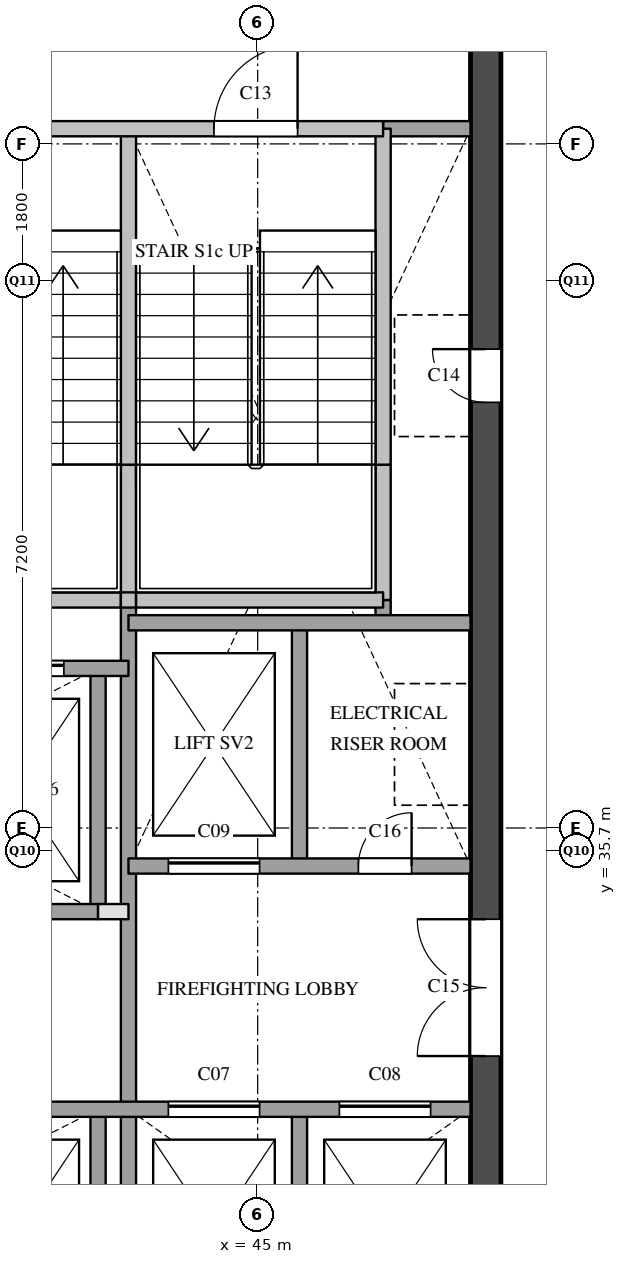
"""IFC4 building model, lengths in metres.
Left out: names, types, materials, properties, quantities, classifications, styles, units other than length and angle.
Written with IfcOpenShell. Run it as: python <this file> out.ifc"""

import sys

from ifc_helpers import new_model, si_unit, direction, frame, frame_2d, origin, place, context, subcontext, project, spatial, rectangle, extrude, element, fill, save


model = new_model("IFC4")
c1 = context("Model", 3, precision=1e-05, world=origin(), true_north=direction((0.0, 1.0)))
c2 = subcontext(c1, "Body", "Model", "MODEL_VIEW")
j1 = project(units=[si_unit("LENGTHUNIT", "METRE"), si_unit("PLANEANGLEUNIT", "RADIAN")], contexts=[c1])
p1 = place(None, origin())
s1 = spatial("IfcSite", under=j1, at=p1, CompositionType="ELEMENT")
p2 = place(p1, origin())
s2 = spatial("IfcBuilding", under=s1, at=p2, CompositionType="ELEMENT")
p3 = place(p2, frame((0.0, 0.0, 215.0)))
s3 = spatial("IfcBuildingStorey", under=s2, at=p3, CompositionType="ELEMENT", Elevation=215.0)
p4 = place(p3, frame((48.0, 29.1, 0.0), z_axis=(0.0, 0.0, 1.0), x_axis=(0.0, 1.0, 0.0)))
e1 = element("IfcWall", 1, at=p4, inside=s3, PredefinedType="SHEAR", context=c2, shape_type="SweptSolid", body=[
    extrude(rectangle(XDim=20.3, YDim=0.4, at=frame_2d((10.15, 0.0))), origin(), (0.0, 0.0, 1.0), 3.6),
])
p5 = place(p4, frame((12.5, 0.0, 0.0)))
e2 = element("IfcOpeningElement", 2, at=p5, cuts=e1, PredefinedType="OPENING", context=c2, shape_type="SweptSolid", body=[
    extrude(rectangle(XDim=0.7, YDim=2.1, at=frame_2d((0.35, 1.05))), frame((0.0, 0.21, 0.0), z_axis=(0.0, -1.0, 0.0), x_axis=(1.0, 0.0, 0.0)), (0.0, 0.0, 1.0), 0.42),
])
p6 = place(p4, frame((3.9, 0.0, 0.0)))
e3 = element("IfcOpeningElement", 3, at=p6, cuts=e1, PredefinedType="OPENING", context=c2, shape_type="SweptSolid", body=[
    extrude(rectangle(XDim=1.8, YDim=2.1, at=frame_2d((0.9, 1.05))), frame((0.0, 0.21, 0.0), z_axis=(0.0, -1.0, 0.0), x_axis=(1.0, 0.0, 0.0)), (0.0, 0.0, 1.0), 0.42),
])
p7 = place(p3, frame((42.9, 29.1, 0.0), z_axis=(0.0, 0.0, 1.0), x_axis=(0.0, 1.0, 0.0)))
e4 = element("IfcWall", 4, at=p7, inside=s3, PredefinedType="SOLIDWALL", context=c2, shape_type="SweptSolid", body=[
    extrude(rectangle(XDim=3.2, YDim=0.2, at=frame_2d((1.6, 0.0))), origin(), (0.0, 0.0, 1.0), 3.6),
])
p8 = place(p3, frame((42.9, 34.9, 0.0), z_axis=(0.0, 0.0, 1.0), x_axis=(0.0, 1.0, 0.0)))
e5 = element("IfcWall", 5, at=p8, inside=s3, PredefinedType="SOLIDWALL", context=c2, shape_type="SweptSolid", body=[
    extrude(rectangle(XDim=3.2, YDim=0.2, at=frame_2d((1.6, 0.0))), origin(), (0.0, 0.0, 1.0), 3.6),
])
p9 = place(p3, frame((43.3, 29.1, 0.0), z_axis=(0.0, 0.0, 1.0), x_axis=(0.0, 1.0, 0.0)))
e6 = element("IfcWall", 6, at=p9, inside=s3, PredefinedType="SOLIDWALL", context=c2, shape_type="SweptSolid", body=[
    extrude(rectangle(XDim=9.9, YDim=0.2, at=frame_2d((4.95, 0.0))), origin(), (0.0, 0.0, 1.0), 3.6),
])
p10 = place(p3, frame((43.3, 39.0, 0.0), z_axis=(0.0, 0.0, 1.0), x_axis=(0.0, 1.0, 0.0)))
e7 = element("IfcWall", 7, at=p10, inside=s3, PredefinedType="SOLIDWALL", context=c2, shape_type="SweptSolid", body=[
    extrude(rectangle(XDim=1.78, YDim=0.2, at=frame_2d((0.89, 0.0))), origin(), (0.0, 0.0, 1.0), 3.6),
])
p11 = place(p3, frame((43.3, 40.78, 0.0), z_axis=(0.0, 0.0, 1.0), x_axis=(0.0, 1.0, 0.0)))
e8 = element("IfcWall", 8, at=p11, inside=s3, PredefinedType="SOLIDWALL", context=c2, shape_type="SweptSolid", body=[
    extrude(rectangle(XDim=4.42, YDim=0.2, at=frame_2d((2.21, 0.0))), origin(), (0.0, 0.0, 1.0), 3.6),
])
for number, where, z_axis, x_axis in (
    (9, (45.55, 29.1, 0.0), (0.0, 0.0, 1.0), (0.0, 1.0, 0.0)),
    (10, (45.55, 35.5, 0.0), (0.0, 0.0, 1.0), (0.0, 1.0, 0.0)),
):
    element("IfcWall", number, at=place(p3, frame(where, z_axis=z_axis, x_axis=x_axis)), inside=s3, PredefinedType="SOLIDWALL", context=c2, shape_type="SweptSolid", body=[
        extrude(rectangle(XDim=3.2, YDim=0.2, at=frame_2d((1.6, 0.0))), origin(), (0.0, 0.0, 1.0), 3.6),
    ])
p12 = place(p3, frame((46.65, 38.7, 0.0), z_axis=(0.0, 0.0, 1.0), x_axis=(0.0, 1.0, 0.0)))
e11 = element("IfcWall", 11, at=p12, inside=s3, PredefinedType="SOLIDWALL", context=c2, shape_type="SweptSolid", body=[
    extrude(rectangle(XDim=0.3, YDim=0.2, at=frame_2d((0.15, 0.0))), origin(), (0.0, 0.0, 1.0), 3.6),
])
p13 = place(p3, frame((46.65, 39.0, 0.0), z_axis=(0.0, 0.0, 1.0), x_axis=(0.0, 1.0, 0.0)))
e12 = element("IfcWall", 12, at=p13, inside=s3, PredefinedType="SOLIDWALL", context=c2, shape_type="SweptSolid", body=[
    extrude(rectangle(XDim=1.78, YDim=0.2, at=frame_2d((0.89, 0.0))), origin(), (0.0, 0.0, 1.0), 3.6),
])
p14 = place(p3, frame((46.65, 40.78, 0.0), z_axis=(0.0, 0.0, 1.0), x_axis=(0.0, 1.0, 0.0)))
e13 = element("IfcWall", 13, at=p14, inside=s3, PredefinedType="SOLIDWALL", context=c2, shape_type="SweptSolid", body=[
    extrude(rectangle(XDim=4.42, YDim=0.2, at=frame_2d((2.21, 0.0))), origin(), (0.0, 0.0, 1.0), 3.6),
])
p15 = place(p3, frame((36.6, 32.3, 0.0), z_axis=(0.0, 0.0, 1.0), x_axis=(1.0, 0.0, 0.0)))
e14 = element("IfcWall", 14, at=p15, inside=s3, PredefinedType="SOLIDWALL", context=c2, shape_type="SweptSolid", body=[
    extrude(rectangle(XDim=11.2, YDim=0.2, at=frame_2d((5.6, 0.0))), origin(), (0.0, 0.0, 1.0), 3.6),
])
p16 = place(p15, frame((7.225, 0.0, 0.0)))
e15 = element("IfcOpeningElement", 15, at=p16, cuts=e14, PredefinedType="OPENING", context=c2, shape_type="SweptSolid", body=[
    extrude(rectangle(XDim=1.2, YDim=2.1, at=frame_2d((0.6, 1.05))), frame((0.0, 0.11, 0.0), z_axis=(0.0, -1.0, 0.0), x_axis=(1.0, 0.0, 0.0)), (0.0, 0.0, 1.0), 0.22),
])
p17 = place(p15, frame((9.475, 0.0, 0.0)))
e16 = element("IfcOpeningElement", 16, at=p17, cuts=e14, PredefinedType="OPENING", context=c2, shape_type="SweptSolid", body=[
    extrude(rectangle(XDim=1.2, YDim=2.1, at=frame_2d((0.6, 1.05))), frame((0.0, 0.11, 0.0), z_axis=(0.0, -1.0, 0.0), x_axis=(1.0, 0.0, 0.0)), (0.0, 0.0, 1.0), 0.22),
])
p18 = place(p3, frame((42.9, 34.9, 0.0), z_axis=(0.0, 0.0, 1.0), x_axis=(1.0, 0.0, 0.0)))
e17 = element("IfcWall", 17, at=p18, inside=s3, PredefinedType="PARTITIONING", context=c2, shape_type="SweptSolid", body=[
    extrude(rectangle(XDim=0.4, YDim=0.2, at=frame_2d((0.2, 0.0))), origin(), (0.0, 0.0, 1.0), 3.6),
])
p19 = place(p3, frame((36.6, 34.9, 0.0), z_axis=(0.0, 0.0, 1.0), x_axis=(1.0, 0.0, 0.0)))
e18 = element("IfcWall", 18, at=p19, inside=s3, PredefinedType="SOLIDWALL", context=c2, shape_type="SweptSolid", body=[
    extrude(rectangle(XDim=6.3, YDim=0.2, at=frame_2d((3.15, 0.0))), origin(), (0.0, 0.0, 1.0), 3.6),
])
p20 = place(p3, frame((43.3, 35.5, 0.0), z_axis=(0.0, 0.0, 1.0), x_axis=(1.0, 0.0, 0.0)))
e19 = element("IfcWall", 19, at=p20, inside=s3, PredefinedType="SOLIDWALL", context=c2, shape_type="SweptSolid", body=[
    extrude(rectangle(XDim=4.5, YDim=0.2, at=frame_2d((2.25, 0.0))), origin(), (0.0, 0.0, 1.0), 3.6),
])
p21 = place(p20, frame((0.525, 0.0, 0.0)))
e20 = element("IfcOpeningElement", 20, at=p21, cuts=e19, PredefinedType="OPENING", context=c2, shape_type="SweptSolid", body=[
    extrude(rectangle(XDim=1.2, YDim=2.1, at=frame_2d((0.6, 1.05))), frame((0.0, 0.11, 0.0), z_axis=(0.0, -1.0, 0.0), x_axis=(1.0, 0.0, 0.0)), (0.0, 0.0, 1.0), 0.22),
])
p22 = place(p20, frame((3.025, 0.0, 0.0)))
e21 = element("IfcOpeningElement", 21, at=p22, cuts=e19, PredefinedType="OPENING", context=c2, shape_type="SweptSolid", body=[
    extrude(rectangle(XDim=0.7, YDim=2.1, at=frame_2d((0.35, 1.05))), frame((0.0, 0.11, 0.0), z_axis=(0.0, -1.0, 0.0), x_axis=(1.0, 0.0, 0.0)), (0.0, 0.0, 1.0), 0.22),
])
p23 = place(p3, frame((36.6, 38.1, 0.0), z_axis=(0.0, 0.0, 1.0), x_axis=(1.0, 0.0, 0.0)))
e22 = element("IfcWall", 22, at=p23, inside=s3, PredefinedType="SOLIDWALL", context=c2, shape_type="SweptSolid", body=[
    extrude(rectangle(XDim=6.7, YDim=0.2, at=frame_2d((3.35, 0.0))), origin(), (0.0, 0.0, 1.0), 3.6),
])
p24 = place(p23, frame((0.45, 0.0, 0.0)))
e23 = element("IfcOpeningElement", 23, at=p24, cuts=e22, PredefinedType="OPENING", context=c2, shape_type="SweptSolid", body=[
    extrude(rectangle(XDim=1.2, YDim=2.1, at=frame_2d((0.6, 1.05))), frame((0.0, 0.11, 0.0), z_axis=(0.0, -1.0, 0.0), x_axis=(1.0, 0.0, 0.0)), (0.0, 0.0, 1.0), 0.22),
])
p25 = place(p23, frame((2.55, 0.0, 0.0)))
e24 = element("IfcOpeningElement", 24, at=p25, cuts=e22, PredefinedType="OPENING", context=c2, shape_type="SweptSolid", body=[
    extrude(rectangle(XDim=1.2, YDim=2.1, at=frame_2d((0.6, 1.05))), frame((0.0, 0.11, 0.0), z_axis=(0.0, -1.0, 0.0), x_axis=(1.0, 0.0, 0.0)), (0.0, 0.0, 1.0), 0.22),
])
p26 = place(p23, frame((4.65, 0.0, 0.0)))
e25 = element("IfcOpeningElement", 25, at=p26, cuts=e22, PredefinedType="OPENING", context=c2, shape_type="SweptSolid", body=[
    extrude(rectangle(XDim=1.2, YDim=2.1, at=frame_2d((0.6, 1.05))), frame((0.0, 0.11, 0.0), z_axis=(0.0, -1.0, 0.0), x_axis=(1.0, 0.0, 0.0)), (0.0, 0.0, 1.0), 0.22),
])
p27 = place(p3, frame((43.3, 38.7, 0.0), z_axis=(0.0, 0.0, 1.0), x_axis=(1.0, 0.0, 0.0)))
e26 = element("IfcWall", 26, at=p27, inside=s3, PredefinedType="SOLIDWALL", context=c2, shape_type="SweptSolid", body=[
    extrude(rectangle(XDim=4.5, YDim=0.2, at=frame_2d((2.25, 0.0))), origin(), (0.0, 0.0, 1.0), 3.6),
])
p28 = place(p3, frame((40.05, 39.0, 0.0), z_axis=(0.0, 0.0, 1.0), x_axis=(1.0, 0.0, 0.0)))
e27 = element("IfcWall", 27, at=p28, inside=s3, PredefinedType="SOLIDWALL", context=c2, shape_type="SweptSolid", body=[
    extrude(rectangle(XDim=3.15, YDim=0.2, at=frame_2d((1.575, 0.0))), origin(), (0.0, 0.0, 1.0), 3.6),
])
p29 = place(p3, frame((43.2, 39.0, 0.0), z_axis=(0.0, 0.0, 1.0), x_axis=(1.0, 0.0, 0.0)))
e28 = element("IfcWall", 28, at=p29, inside=s3, PredefinedType="SOLIDWALL", context=c2, shape_type="SweptSolid", body=[
    extrude(rectangle(XDim=0.2, YDim=0.2, at=frame_2d((0.1, 0.0))), origin(), (0.0, 0.0, 1.0), 3.6),
])
p30 = place(p3, frame((43.4, 39.0, 0.0), z_axis=(0.0, 0.0, 1.0), x_axis=(1.0, 0.0, 0.0)))
e29 = element("IfcWall", 29, at=p30, inside=s3, PredefinedType="SOLIDWALL", context=c2, shape_type="SweptSolid", body=[
    extrude(rectangle(XDim=3.25, YDim=0.2, at=frame_2d((1.625, 0.0))), origin(), (0.0, 0.0, 1.0), 3.6),
])
p31 = place(p3, frame((46.65, 45.2, 0.0), z_axis=(0.0, 0.0, 1.0), x_axis=(1.0, 0.0, 0.0)))
e30 = element("IfcWall", 30, at=p31, inside=s3, PredefinedType="SOLIDWALL", context=c2, shape_type="SweptSolid", body=[
    extrude(rectangle(XDim=1.15, YDim=0.2, at=frame_2d((0.575, 0.0))), origin(), (0.0, 0.0, 1.0), 3.6),
])
p32 = place(p3, frame((36.6, 45.2, 0.0), z_axis=(0.0, 0.0, 1.0), x_axis=(1.0, 0.0, 0.0)))
e31 = element("IfcWall", 31, at=p32, inside=s3, PredefinedType="SOLIDWALL", context=c2, shape_type="SweptSolid", body=[
    extrude(rectangle(XDim=10.05, YDim=0.2, at=frame_2d((5.025, 0.0))), origin(), (0.0, 0.0, 1.0), 3.6),
])
p33 = place(p32, frame((1.125, 0.0, 0.0)))
e32 = element("IfcOpeningElement", 32, at=p33, cuts=e31, PredefinedType="OPENING", context=c2, shape_type="SweptSolid", body=[
    extrude(rectangle(XDim=1.1, YDim=2.1, at=frame_2d((0.55, 1.05))), frame((0.0, 0.11, 0.0), z_axis=(0.0, -1.0, 0.0), x_axis=(1.0, 0.0, 0.0)), (0.0, 0.0, 1.0), 0.22),
])
p34 = place(p32, frame((4.475, 0.0, 0.0)))
e33 = element("IfcOpeningElement", 33, at=p34, cuts=e31, PredefinedType="OPENING", context=c2, shape_type="SweptSolid", body=[
    extrude(rectangle(XDim=1.1, YDim=2.1, at=frame_2d((0.55, 1.05))), frame((0.0, 0.11, 0.0), z_axis=(0.0, -1.0, 0.0), x_axis=(1.0, 0.0, 0.0)), (0.0, 0.0, 1.0), 0.22),
])
p35 = place(p32, frame((7.825, 0.0, 0.0)))
e34 = element("IfcOpeningElement", 34, at=p35, cuts=e31, PredefinedType="OPENING", context=c2, shape_type="SweptSolid", body=[
    extrude(rectangle(XDim=1.1, YDim=2.1, at=frame_2d((0.55, 1.05))), frame((0.0, 0.11, 0.0), z_axis=(0.0, -1.0, 0.0), x_axis=(1.0, 0.0, 0.0)), (0.0, 0.0, 1.0), 0.22),
])
p36 = place(p26, origin())
e35 = element("IfcDoor", 35, at=p36, inside=s3, OperationType="SLIDING_TO_LEFT", PredefinedType="DOOR", context=c2, shape_type="SweptSolid", body=[
    extrude(rectangle(XDim=1.2, YDim=2.1, at=frame_2d((0.6, 1.05))), frame((0.0, 0.025, 0.0), z_axis=(0.0, -1.0, 0.0), x_axis=(1.0, 0.0, 0.0)), (0.0, 0.0, 1.0), 0.05),
])
fill(e25, e35)
p37 = place(p16, origin())
e36 = element("IfcDoor", 36, at=p37, inside=s3, OperationType="SLIDING_TO_LEFT", PredefinedType="DOOR", context=c2, shape_type="SweptSolid", body=[
    extrude(rectangle(XDim=1.2, YDim=2.1, at=frame_2d((0.6, 1.05))), frame((0.0, 0.025, 0.0), z_axis=(0.0, -1.0, 0.0), x_axis=(1.0, 0.0, 0.0)), (0.0, 0.0, 1.0), 0.05),
])
fill(e15, e36)
p38 = place(p17, origin())
e37 = element("IfcDoor", 37, at=p38, inside=s3, OperationType="SLIDING_TO_LEFT", PredefinedType="DOOR", context=c2, shape_type="SweptSolid", body=[
    extrude(rectangle(XDim=1.2, YDim=2.1, at=frame_2d((0.6, 1.05))), frame((0.0, 0.025, 0.0), z_axis=(0.0, -1.0, 0.0), x_axis=(1.0, 0.0, 0.0)), (0.0, 0.0, 1.0), 0.05),
])
fill(e16, e37)
p39 = place(p21, origin())
e38 = element("IfcDoor", 38, at=p39, inside=s3, OperationType="SLIDING_TO_LEFT", PredefinedType="DOOR", context=c2, shape_type="SweptSolid", body=[
    extrude(rectangle(XDim=1.2, YDim=2.1, at=frame_2d((0.6, 1.05))), frame((0.0, 0.025, 0.0), z_axis=(0.0, -1.0, 0.0), x_axis=(1.0, 0.0, 0.0)), (0.0, 0.0, 1.0), 0.05),
])
fill(e20, e38)
p40 = place(p35, origin())
e39 = element("IfcDoor", 39, at=p40, inside=s3, OperationType="SINGLE_SWING_RIGHT", PredefinedType="DOOR", context=c2, shape_type="SweptSolid", body=[
    extrude(rectangle(XDim=1.1, YDim=2.1, at=frame_2d((0.55, 1.05))), frame((0.0, 0.025, 0.0), z_axis=(0.0, -1.0, 0.0), x_axis=(1.0, 0.0, 0.0)), (0.0, 0.0, 1.0), 0.05),
])
fill(e34, e39)
p41 = place(p5, origin())
e40 = element("IfcDoor", 40, at=p41, inside=s3, OperationType="SINGLE_SWING_RIGHT", PredefinedType="DOOR", context=c2, shape_type="SweptSolid", body=[
    extrude(rectangle(XDim=0.7, YDim=2.1, at=frame_2d((0.35, 1.05))), frame((0.0, 0.025, 0.0), z_axis=(0.0, -1.0, 0.0), x_axis=(1.0, 0.0, 0.0)), (0.0, 0.0, 1.0), 0.05),
])
fill(e2, e40)
p42 = place(p6, origin())
e41 = element("IfcDoor", 41, at=p42, inside=s3, OperationType="DOUBLE_DOOR_SINGLE_SWING", PredefinedType="DOOR", context=c2, shape_type="SweptSolid", body=[
    extrude(rectangle(XDim=1.8, YDim=2.1, at=frame_2d((0.9, 1.05))), frame((0.0, 0.025, 0.0), z_axis=(0.0, -1.0, 0.0), x_axis=(1.0, 0.0, 0.0)), (0.0, 0.0, 1.0), 0.05),
])
fill(e3, e41)
p43 = place(p22, origin())
e42 = element("IfcDoor", 42, at=p43, inside=s3, OperationType="SINGLE_SWING_RIGHT", PredefinedType="DOOR", context=c2, shape_type="SweptSolid", body=[
    extrude(rectangle(XDim=0.7, YDim=2.1, at=frame_2d((0.35, 1.05))), frame((0.0, 0.025, 0.0), z_axis=(0.0, -1.0, 0.0), x_axis=(1.0, 0.0, 0.0)), (0.0, 0.0, 1.0), 0.05),
])
fill(e21, e42)
save(model, sys.argv[1])
